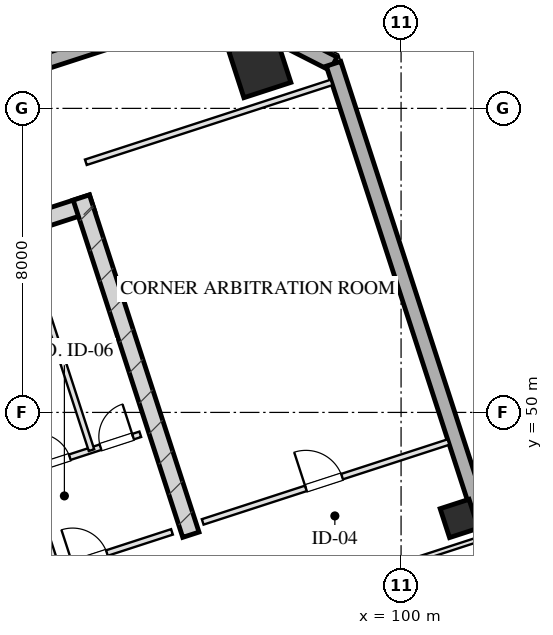
"""IFC4 building model, lengths in metres.
Left out: names, types, materials, properties, quantities, classifications, styles, units other than length and angle.
Written with IfcOpenShell. Run it as: python <this file> out.ifc"""

import sys

from ifc_helpers import new_model, si_unit, direction, frame, frame_2d, origin, origin_2d, place, context, subcontext, project, spatial, rectangle, hollow_rectangle, extrude, element, fill, save


model = new_model("IFC4")
c1 = context("Model", 3, precision=1e-05, world=origin(), true_north=direction((0.0, 1.0)))
c2 = subcontext(c1, "Body", "Model", "MODEL_VIEW")
j1 = project(units=[si_unit("LENGTHUNIT", "METRE"), si_unit("PLANEANGLEUNIT", "RADIAN")], contexts=[c1])
p1 = place(None, origin())
s1 = spatial("IfcSite", under=j1, at=p1, CompositionType="ELEMENT")
p2 = place(p1, origin())
s2 = spatial("IfcBuilding", under=s1, at=p2, CompositionType="ELEMENT")
p3 = place(p2, frame((0.0, 0.0, 192.05)))
s3 = spatial("IfcBuildingStorey", under=s2, at=p3, CompositionType="ELEMENT", Elevation=192.05)
p4 = place(p3, frame((76.415, 50.489, 0.0), z_axis=(0.0, 0.0, 1.0), x_axis=(0.951056810414, 0.309016089169, 0.0)))
e1 = element("IfcWall", 1, at=p4, inside=s3, PredefinedType="SHEAR", context=c2, shape_type="SweptSolid", body=[
    extrude(rectangle(XDim=16.25, YDim=0.45, at=frame_2d((8.125, 0.0))), origin(), (0.0, 0.0, 1.0), 3.45),
])
p5 = place(p3, frame((94.469, 46.781, 0.0), z_axis=(0.0, 0.0, 1.0), x_axis=(-0.309004419953, 0.951060601881, 0.0)))
e2 = element("IfcWall", 2, at=p5, inside=s3, PredefinedType="SHEAR", context=c2, shape_type="SweptSolid", body=[
    extrude(rectangle(XDim=9.33, YDim=0.45, at=frame_2d((4.665, 0.0))), origin(), (0.0, 0.0, 1.0), 3.45),
])
p6 = place(p3, frame((96.281, 59.099, 0.0), z_axis=(0.0, 0.0, 1.0), x_axis=(0.951056516295, 0.309016994375, 0.0)))
e3 = element("IfcColumn", 3, at=p6, inside=s3, PredefinedType="COLUMN", context=c2, shape_type="SweptSolid", body=[
    extrude(hollow_rectangle(XDim=1.3, YDim=1.3, WallThickness=0.045, at=origin_2d()), origin(), (0.0, 0.0, 1.0), 3.451),
])
p7 = place(p3, frame((101.532, 47.21, 0.0), z_axis=(0.0, 0.0, 1.0), x_axis=(0.951056516295, 0.309016994375, 0.0)))
e4 = element("IfcColumn", 4, at=p7, inside=s3, PredefinedType="COLUMN", context=c2, shape_type="SweptSolid", body=[
    extrude(hollow_rectangle(XDim=0.8, YDim=0.8, WallThickness=0.028, at=origin_2d()), origin(), (0.0, 0.0, 1.0), 3.451),
])
p8 = place(p3, frame((70.092, 52.556, 0.0), z_axis=(0.0, 0.0, 1.0), x_axis=(0.951057580055, 0.30901372044, 0.0)))
e5 = element("IfcWall", 5, at=p8, inside=s3, PredefinedType="SOLIDWALL", context=c2, shape_type="SweptSolid", body=[
    extrude(rectangle(XDim=26.4, YDim=0.4, at=frame_2d((13.2, 0.0))), origin(), (0.0, 0.0, 1.0), 2.61),
])
p9 = place(p3, frame((95.199, 60.714, 0.0), z_axis=(0.0, 0.0, 1.0), x_axis=(0.891020832027, -0.453962417932, 0.0)))
e6 = element("IfcWall", 6, at=p9, inside=s3, PredefinedType="SOLIDWALL", context=c2, shape_type="SweptSolid", body=[
    extrude(rectangle(XDim=3.394, YDim=0.4, at=frame_2d((1.697, 0.0))), origin(), (0.0, 0.0, 1.0), 2.61),
])
p10 = place(p3, frame((98.224, 59.173, 0.0), z_axis=(0.0, 0.0, 1.0), x_axis=(0.309014228706, -0.951057414911, 0.0)))
e7 = element("IfcWall", 7, at=p10, inside=s3, PredefinedType="SOLIDWALL", context=c2, shape_type="SweptSolid", body=[
    extrude(rectangle(XDim=42.8, YDim=0.4, at=frame_2d((21.4, 0.0))), origin(), (0.0, 0.0, 1.0), 2.61),
])
p11 = place(p10, frame((26.75, 0.0, 0.75)))
e8 = element("IfcOpeningElement", 8, at=p11, cuts=e7, PredefinedType="OPENING", context=c2, shape_type="SweptSolid", body=[
    extrude(rectangle(XDim=2.1, YDim=1.46, at=frame_2d((1.05, 0.73))), frame((0.0, 0.21, 0.0), z_axis=(0.0, -1.0, 0.0), x_axis=(1.0, 0.0, 0.0)), (0.0, 0.0, 1.0), 0.42),
])
p12 = place(p10, frame((22.95, 0.0, 0.75)))
e9 = element("IfcOpeningElement", 9, at=p12, cuts=e7, PredefinedType="OPENING", context=c2, shape_type="SweptSolid", body=[
    extrude(rectangle(XDim=2.1, YDim=1.46, at=frame_2d((1.05, 0.73))), frame((0.0, 0.21, 0.0), z_axis=(0.0, -1.0, 0.0), x_axis=(1.0, 0.0, 0.0)), (0.0, 0.0, 1.0), 0.42),
])
p13 = place(p10, frame((17.75, 0.0, 0.75)))
e10 = element("IfcOpeningElement", 10, at=p13, cuts=e7, PredefinedType="OPENING", context=c2, shape_type="SweptSolid", body=[
    extrude(rectangle(XDim=2.1, YDim=1.46, at=frame_2d((1.05, 0.73))), frame((0.0, 0.21, 0.0), z_axis=(0.0, -1.0, 0.0), x_axis=(1.0, 0.0, 0.0)), (0.0, 0.0, 1.0), 0.42),
])
p14 = place(p10, frame((13.95, 0.0, 0.75)))
e11 = element("IfcOpeningElement", 11, at=p14, cuts=e7, PredefinedType="OPENING", context=c2, shape_type="SweptSolid", body=[
    extrude(rectangle(XDim=2.1, YDim=1.46, at=frame_2d((1.05, 0.73))), frame((0.0, 0.21, 0.0), z_axis=(0.0, -1.0, 0.0), x_axis=(1.0, 0.0, 0.0)), (0.0, 0.0, 1.0), 0.42),
])
p15 = place(p3, frame((90.928, 45.868, 0.0), z_axis=(0.0, 0.0, 1.0), x_axis=(-0.309042196757, 0.951048327176, 0.0)))
e12 = element("IfcWall", 12, at=p15, inside=s3, PredefinedType="PARTITIONING", context=c2, shape_type="SweptSolid", body=[
    extrude(rectangle(XDim=8.43, YDim=0.2, at=frame_2d((4.215, 0.0))), origin(), (0.0, 0.0, 1.0), 3.175),
])
p16 = place(p3, frame((90.928, 45.868, 0.0), z_axis=(0.0, 0.0, 1.0), x_axis=(0.951059297078, 0.309008435874, 0.0)))
e13 = element("IfcWall", 13, at=p16, inside=s3, PredefinedType="PARTITIONING", context=c2, shape_type="SweptSolid", body=[
    extrude(rectangle(XDim=3.2, YDim=0.15, at=frame_2d((1.6, 0.0))), origin(), (0.0, 0.0, 1.0), 3.175),
])
p17 = place(p16, frame((0.45, 0.0, 0.0)))
e14 = element("IfcOpeningElement", 14, at=p17, cuts=e13, PredefinedType="OPENING", context=c2, shape_type="SweptSolid", body=[
    extrude(rectangle(XDim=0.95, YDim=2.05, at=frame_2d((0.475, 1.025))), frame((0.0, 0.085, 0.0), z_axis=(0.0, -1.0, 0.0), x_axis=(1.0, 0.0, 0.0)), (0.0, 0.0, 1.0), 0.17),
])
p18 = place(p3, frame((90.094, 48.436, 0.0), z_axis=(0.0, 0.0, 1.0), x_axis=(0.951066581729, 0.308986014439, 0.0)))
e15 = element("IfcWall", 15, at=p18, inside=s3, PredefinedType="PARTITIONING", context=c2, shape_type="SweptSolid", body=[
    extrude(rectangle(XDim=3.2, YDim=0.15, at=frame_2d((1.6, 0.0))), origin(), (0.0, 0.0, 1.0), 3.175),
])
p19 = place(p18, frame((0.35, 0.0, 0.0)))
e16 = element("IfcOpeningElement", 16, at=p19, cuts=e15, PredefinedType="OPENING", context=c2, shape_type="SweptSolid", body=[
    extrude(rectangle(XDim=0.9, YDim=2.05, at=frame_2d((0.45, 1.025))), frame((0.0, 0.085, 0.0), z_axis=(0.0, -1.0, 0.0), x_axis=(1.0, 0.0, 0.0)), (0.0, 0.0, 1.0), 0.17),
])
p20 = place(p18, frame((2.1, 0.0, 0.0)))
e17 = element("IfcOpeningElement", 17, at=p20, cuts=e15, PredefinedType="OPENING", context=c2, shape_type="SweptSolid", body=[
    extrude(rectangle(XDim=0.9, YDim=2.05, at=frame_2d((0.45, 1.025))), frame((0.0, 0.085, 0.0), z_axis=(0.0, -1.0, 0.0), x_axis=(1.0, 0.0, 0.0)), (0.0, 0.0, 1.0), 0.17),
])
p21 = place(p3, frame((91.853, 49.007, 0.0), z_axis=(0.0, 0.0, 1.0), x_axis=(-0.309022487551, 0.951054731437, 0.0)))
e18 = element("IfcWall", 18, at=p21, inside=s3, PredefinedType="PARTITIONING", context=c2, shape_type="SweptSolid", body=[
    extrude(rectangle(XDim=5.73, YDim=0.15, at=frame_2d((2.865, 0.0))), origin(), (0.0, 0.0, 1.0), 3.175),
])
p22 = place(p3, frame((91.705, 56.582, 0.0), z_axis=(0.0, 0.0, 1.0), x_axis=(0.951057811516, 0.309013008068, 0.0)))
e19 = element("IfcWall", 19, at=p22, inside=s3, PredefinedType="PARTITIONING", context=c2, shape_type="SweptSolid", body=[
    extrude(rectangle(XDim=6.8, YDim=0.15, at=frame_2d((3.4, 0.0))), origin(), (0.0, 0.0, 1.0), 3.175),
])
p23 = place(p3, frame((94.78, 47.119, 0.0), z_axis=(0.0, 0.0, 1.0), x_axis=(0.951057811516, 0.309013008068, 0.0)))
e20 = element("IfcWall", 20, at=p23, inside=s3, PredefinedType="PARTITIONING", context=c2, shape_type="SweptSolid", body=[
    extrude(rectangle(XDim=6.8, YDim=0.15, at=frame_2d((3.4, 0.0))), origin(), (0.0, 0.0, 1.0), 3.175),
])
p24 = place(p23, frame((2.856, 0.0, 0.0)))
e21 = element("IfcOpeningElement", 21, at=p24, cuts=e20, PredefinedType="OPENING", context=c2, shape_type="SweptSolid", body=[
    extrude(rectangle(XDim=1.0, YDim=2.05, at=frame_2d((0.5, 1.025))), frame((0.0, 0.085, 0.0), z_axis=(0.0, -1.0, 0.0), x_axis=(1.0, 0.0, 0.0)), (0.0, 0.0, 1.0), 0.17),
])
p25 = place(p3, frame((90.71, 42.979, 0.0), z_axis=(0.0, 0.0, 1.0), x_axis=(0.95105853842, 0.309010770845, 0.0)))
e22 = element("IfcWall", 22, at=p25, inside=s3, PredefinedType="PARTITIONING", context=c2, shape_type="SweptSolid", body=[
    extrude(rectangle(XDim=11.95, YDim=0.12, at=frame_2d((5.975, 0.0))), origin(), (0.0, 0.0, 1.0), 3.175),
])
p26 = place(p17, origin())
e23 = element("IfcDoor", 23, at=p26, inside=s3, OperationType="SINGLE_SWING_LEFT", PredefinedType="DOOR", context=c2, shape_type="SweptSolid", body=[
    extrude(rectangle(XDim=0.95, YDim=2.05, at=frame_2d((0.475, 1.025))), frame((0.0, 0.025, 0.0), z_axis=(0.0, -1.0, 0.0), x_axis=(1.0, 0.0, 0.0)), (0.0, 0.0, 1.0), 0.05),
])
fill(e14, e23)
p27 = place(p19, origin())
e24 = element("IfcDoor", 24, at=p27, inside=s3, OperationType="SINGLE_SWING_LEFT", PredefinedType="DOOR", context=c2, shape_type="SweptSolid", body=[
    extrude(rectangle(XDim=0.9, YDim=2.05, at=frame_2d((0.45, 1.025))), frame((0.0, 0.025, 0.0), z_axis=(0.0, -1.0, 0.0), x_axis=(1.0, 0.0, 0.0)), (0.0, 0.0, 1.0), 0.05),
])
fill(e16, e24)
p28 = place(p20, origin())
e25 = element("IfcDoor", 25, at=p28, inside=s3, OperationType="SINGLE_SWING_RIGHT", PredefinedType="DOOR", context=c2, shape_type="SweptSolid", body=[
    extrude(rectangle(XDim=0.9, YDim=2.05, at=frame_2d((0.45, 1.025))), frame((0.0, 0.025, 0.0), z_axis=(0.0, -1.0, 0.0), x_axis=(1.0, 0.0, 0.0)), (0.0, 0.0, 1.0), 0.05),
])
fill(e17, e25)
p29 = place(p24, origin())
e26 = element("IfcDoor", 26, at=p29, inside=s3, OperationType="SINGLE_SWING_LEFT", PredefinedType="DOOR", context=c2, shape_type="SweptSolid", body=[
    extrude(rectangle(XDim=1.0, YDim=2.05, at=frame_2d((0.5, 1.025))), frame((0.0, 0.025, 0.0), z_axis=(0.0, -1.0, 0.0), x_axis=(1.0, 0.0, 0.0)), (0.0, 0.0, 1.0), 0.05),
])
fill(e21, e26)
save(model, sys.argv[1])
